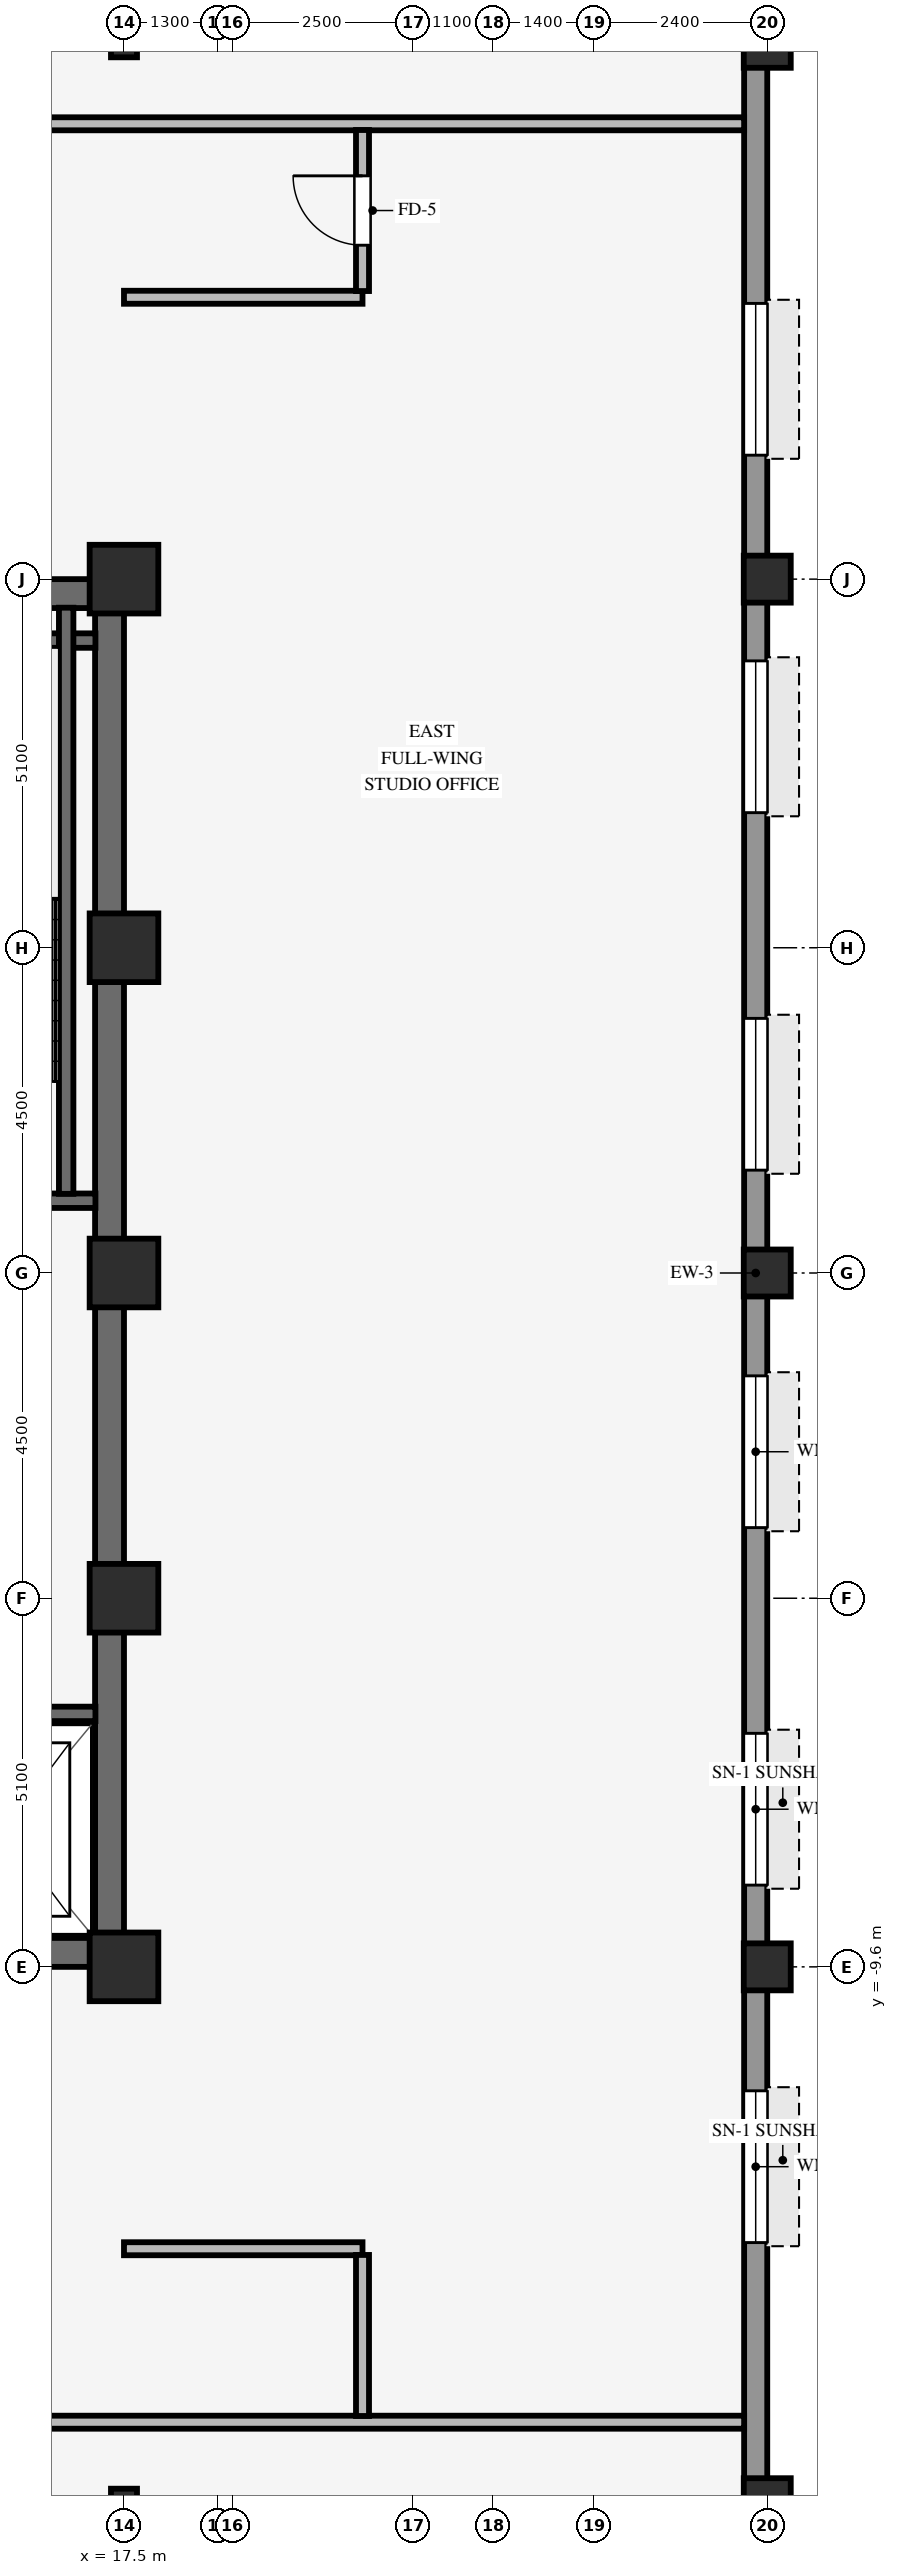
"""IFC4 building model, lengths in metres.
Left out: names, types, materials, properties, quantities, classifications, styles, units other than length and angle.
Written with IfcOpenShell. Run it as: python <this file> out.ifc"""

import sys

from ifc_helpers import new_model, si_unit, direction, frame, frame_2d, origin, origin_2d, place, context, subcontext, project, spatial, rectangle, hollow_rectangle, i_section, extrude, source, transform, mapped, element, fill, save


model = new_model("IFC4")
c1 = context("Model", 3, precision=1e-05, world=origin(), true_north=direction((0.0, 1.0)))
c2 = subcontext(c1, "Body", "Model", "MODEL_VIEW")
j1 = project(units=[si_unit("LENGTHUNIT", "METRE"), si_unit("PLANEANGLEUNIT", "RADIAN")], contexts=[c1])
p1 = place(None, origin())
s1 = spatial("IfcSite", under=j1, at=p1, CompositionType="ELEMENT")
p2 = place(p1, origin())
s2 = spatial("IfcBuilding", under=s1, at=p2, CompositionType="ELEMENT")
p3 = place(p2, frame((0.0, 0.0, 156.7)))
s3 = spatial("IfcBuildingStorey", under=s2, at=p3, CompositionType="ELEMENT", Elevation=156.7)
for number, where, z_axis, x_axis in (
    (1, (9.0, -9.4, 0.0), (0.0, 0.0, 1.0), (1.0, 0.0, 0.0)),
    (2, (9.0, 9.4, 0.0), (0.0, 0.0, 1.0), (1.0, 0.0, 0.0)),
):
    element("IfcWall", number, at=place(p3, frame(where, z_axis=z_axis, x_axis=x_axis)), inside=s3, PredefinedType="SHEAR", context=c2, shape_type="SweptSolid", body=[
        extrude(rectangle(XDim=8.5, YDim=0.4, at=frame_2d((4.25, 0.0))), origin(), (0.0, 0.0, 1.0), 3.37),
    ])
p4 = place(p3, frame((17.3, -9.205, 0.0), z_axis=(0.0, 0.0, 1.0), x_axis=(0.0, 1.0, 0.0)))
e3 = element("IfcWall", 3, at=p4, inside=s3, PredefinedType="SHEAR", context=c2, shape_type="SweptSolid", body=[
    extrude(rectangle(XDim=18.41, YDim=0.4, at=frame_2d((9.205, 0.0))), origin(), (0.0, 0.0, 1.0), 3.37),
])
for number, where, z_axis, x_axis in (
    (4, (17.5, -9.6, 0.0), (0.0, 0.0, 1.0), (1.0, 0.0, 0.0)),
    (5, (17.5, -4.5, 0.0), (0.0, 0.0, 1.0), (1.0, 0.0, 0.0)),
    (6, (17.5, 4.5, 0.0), (0.0, 0.0, 1.0), (1.0, 0.0, 0.0)),
    (7, (17.5, 9.6, 0.0), (0.0, 0.0, 1.0), (1.0, 0.0, 0.0)),
    (8, (17.5, 0.0, 0.0), (0.0, 0.0, 1.0), (1.0, 0.0, 0.0)),
):
    element("IfcColumn", number, at=place(p3, frame(where, z_axis=z_axis, x_axis=x_axis)), inside=s3, PredefinedType="COLUMN", context=c2, shape_type="SweptSolid", body=[
        extrude(rectangle(XDim=0.95, YDim=0.95, at=origin_2d()), origin(), (0.0, 0.0, 1.0), 3.37),
    ])
for number, where, z_axis, x_axis in (
    (9, (26.4, -17.0, 0.0), (0.0, 0.0, 1.0), (1.0, 0.0, 0.0)),
    (10, (26.4, -9.6, 0.0), (0.0, 0.0, 1.0), (1.0, 0.0, 0.0)),
    (11, (26.4, 0.0, 0.0), (0.0, 0.0, 1.0), (1.0, 0.0, 0.0)),
    (12, (26.4, 9.6, 0.0), (0.0, 0.0, 1.0), (1.0, 0.0, 0.0)),
    (13, (26.4, 17.0, 0.0), (0.0, 0.0, 1.0), (1.0, 0.0, 0.0)),
):
    element("IfcColumn", number, at=place(p3, frame(where, z_axis=z_axis, x_axis=x_axis)), inside=s3, PredefinedType="COLUMN", context=c2, shape_type="SweptSolid", body=[
        extrude(hollow_rectangle(XDim=0.65, YDim=0.65, WallThickness=0.04, InnerFilletRadius=0.04, OuterFilletRadius=0.08, at=origin_2d()), origin(), (0.0, 0.0, 1.0), 3.37),
    ])
for number, where, z_axis, x_axis in (
    (14, (17.5, -17.0, 0.0), (0.0, 0.0, 1.0), (1.0, 0.0, 0.0)),
    (15, (17.5, 17.0, 0.0), (0.0, 0.0, 1.0), (1.0, 0.0, 0.0)),
):
    element("IfcColumn", number, at=place(p3, frame(where, z_axis=z_axis, x_axis=x_axis)), inside=s3, PredefinedType="COLUMN", context=c2, shape_type="SweptSolid", body=[
        extrude(i_section(OverallWidth=0.36, OverallDepth=0.36, WebThickness=0.021, FlangeThickness=0.021, FilletRadius=0.018, at=origin_2d()), origin(), (0.0, 0.0, 1.0), 3.37),
    ])
p5 = place(p3, frame((26.24, -20.784, 0.0), z_axis=(0.0, 0.0, 1.0), x_axis=(0.0, 1.0, 0.0)))
e16 = element("IfcWall", 16, at=p5, inside=s3, PredefinedType="STANDARD", context=c2, shape_type="SweptSolid", body=[
    extrude(rectangle(XDim=41.568, YDim=0.32, at=frame_2d((20.784, 0.0))), origin(), (0.0, 0.0, 1.0), 2.705),
])
p6 = place(p5, frame((7.369, 0.0, 0.8)))
e17 = element("IfcOpeningElement", 17, at=p6, cuts=e16, PredefinedType="OPENING", context=c2, shape_type="SweptSolid", body=[
    extrude(rectangle(XDim=2.1, YDim=1.56, at=frame_2d((1.05, 0.78))), frame((0.0, 0.17, 0.0), z_axis=(0.0, -1.0, 0.0), x_axis=(1.0, 0.0, 0.0)), (0.0, 0.0, 1.0), 0.34),
])
p7 = place(p5, frame((12.315, 0.0, 0.8)))
e18 = element("IfcOpeningElement", 18, at=p7, cuts=e16, PredefinedType="OPENING", context=c2, shape_type="SweptSolid", body=[
    extrude(rectangle(XDim=2.1, YDim=1.56, at=frame_2d((1.05, 0.78))), frame((0.0, 0.17, 0.0), z_axis=(0.0, -1.0, 0.0), x_axis=(1.0, 0.0, 0.0)), (0.0, 0.0, 1.0), 0.34),
])
p8 = place(p5, frame((17.261, 0.0, 0.8)))
e19 = element("IfcOpeningElement", 19, at=p8, cuts=e16, PredefinedType="OPENING", context=c2, shape_type="SweptSolid", body=[
    extrude(rectangle(XDim=2.1, YDim=1.56, at=frame_2d((1.05, 0.78))), frame((0.0, 0.17, 0.0), z_axis=(0.0, -1.0, 0.0), x_axis=(1.0, 0.0, 0.0)), (0.0, 0.0, 1.0), 0.34),
])
p9 = place(p5, frame((22.207, 0.0, 0.8)))
e20 = element("IfcOpeningElement", 20, at=p9, cuts=e16, PredefinedType="OPENING", context=c2, shape_type="SweptSolid", body=[
    extrude(rectangle(XDim=2.1, YDim=1.56, at=frame_2d((1.05, 0.78))), frame((0.0, 0.17, 0.0), z_axis=(0.0, -1.0, 0.0), x_axis=(1.0, 0.0, 0.0)), (0.0, 0.0, 1.0), 0.34),
])
p10 = place(p5, frame((27.153, 0.0, 0.8)))
e21 = element("IfcOpeningElement", 21, at=p10, cuts=e16, PredefinedType="OPENING", context=c2, shape_type="SweptSolid", body=[
    extrude(rectangle(XDim=2.1, YDim=1.56, at=frame_2d((1.05, 0.78))), frame((0.0, 0.17, 0.0), z_axis=(0.0, -1.0, 0.0), x_axis=(1.0, 0.0, 0.0)), (0.0, 0.0, 1.0), 0.34),
])
p11 = place(p5, frame((32.099, 0.0, 0.8)))
e22 = element("IfcOpeningElement", 22, at=p11, cuts=e16, PredefinedType="OPENING", context=c2, shape_type="SweptSolid", body=[
    extrude(rectangle(XDim=2.1, YDim=1.56, at=frame_2d((1.05, 0.78))), frame((0.0, 0.17, 0.0), z_axis=(0.0, -1.0, 0.0), x_axis=(1.0, 0.0, 0.0)), (0.0, 0.0, 1.0), 0.34),
])
for number, where, z_axis, x_axis in (
    (23, (13.535, 1.0, 0.0), (0.0, 0.0, 1.0), (1.0, 0.0, 0.0)),
    (24, (13.535, 8.75, 0.0), (0.0, 0.0, 1.0), (1.0, 0.0, 0.0)),
):
    element("IfcWall", number, at=place(p3, frame(where, z_axis=z_axis, x_axis=x_axis)), inside=s3, PredefinedType="SHEAR", context=c2, shape_type="SweptSolid", body=[
        extrude(rectangle(XDim=3.57, YDim=0.2, at=frame_2d((1.785, 0.0))), origin(), (0.0, 0.0, 1.0), 3.37),
    ])
p12 = place(p3, frame((16.7, 1.095, 0.0), z_axis=(0.0, 0.0, 1.0), x_axis=(0.0, 1.0, 0.0)))
e25 = element("IfcWall", 25, at=p12, inside=s3, PredefinedType="SHEAR", context=c2, shape_type="SweptSolid", body=[
    extrude(rectangle(XDim=8.11, YDim=0.2, at=frame_2d((4.055, 0.0))), origin(), (0.0, 0.0, 1.0), 3.37),
])
p13 = place(p3, frame((14.645, -6.1, 0.0), z_axis=(0.0, 0.0, 1.0), x_axis=(1.0, 0.0, 0.0)))
e26 = element("IfcWall", 26, at=p13, inside=s3, PredefinedType="SHEAR", context=c2, shape_type="SweptSolid", body=[
    extrude(rectangle(XDim=2.46, YDim=0.2, at=frame_2d((1.23, 0.0))), origin(), (0.0, 0.0, 1.0), 3.37),
])
p14 = place(p3, frame((-26.08, -15.9, 0.0), z_axis=(0.0, 0.0, 1.0), x_axis=(1.0, 0.0, 0.0)))
e27 = element("IfcWall", 27, at=p14, inside=s3, PredefinedType="PARTITIONING", context=c2, shape_type="SweptSolid", body=[
    extrude(rectangle(XDim=52.16, YDim=0.18, at=frame_2d((26.08, 0.0))), origin(), (0.0, 0.0, 1.0), 3.36),
])
p15 = place(p14, frame((24.5, 0.0, 0.0)))
e28 = element("IfcOpeningElement", 28, at=p15, cuts=e27, PredefinedType="OPENING", context=c2, shape_type="SweptSolid", body=[
    extrude(rectangle(XDim=0.96, YDim=2.1, at=frame_2d((0.48, 1.05))), frame((0.0, 0.1, 0.0), z_axis=(0.0, -1.0, 0.0), x_axis=(1.0, 0.0, 0.0)), (0.0, 0.0, 1.0), 0.2),
])
p16 = place(p14, frame((40.5, 0.0, 0.0)))
e29 = element("IfcOpeningElement", 29, at=p16, cuts=e27, PredefinedType="OPENING", context=c2, shape_type="SweptSolid", body=[
    extrude(rectangle(XDim=0.96, YDim=2.1, at=frame_2d((0.48, 1.05))), frame((0.0, 0.1, 0.0), z_axis=(0.0, -1.0, 0.0), x_axis=(1.0, 0.0, 0.0)), (0.0, 0.0, 1.0), 0.2),
])
p17 = place(p14, frame((13.16, 0.0, 0.0)))
e30 = element("IfcOpeningElement", 30, at=p17, cuts=e27, PredefinedType="OPENING", context=c2, shape_type="SweptSolid", body=[
    extrude(rectangle(XDim=0.96, YDim=2.1, at=frame_2d((0.48, 1.05))), frame((0.0, 0.1, 0.0), z_axis=(0.0, -1.0, 0.0), x_axis=(1.0, 0.0, 0.0)), (0.0, 0.0, 1.0), 0.2),
])
p18 = place(p14, frame((6.425, 0.0, 0.0)))
e31 = element("IfcOpeningElement", 31, at=p18, cuts=e27, PredefinedType="OPENING", context=c2, shape_type="SweptSolid", body=[
    extrude(rectangle(XDim=0.96, YDim=2.1, at=frame_2d((0.48, 1.05))), frame((0.0, 0.1, 0.0), z_axis=(0.0, -1.0, 0.0), x_axis=(1.0, 0.0, 0.0)), (0.0, 0.0, 1.0), 0.2),
])
for number, where, z_axis, x_axis in (
    (32, (17.5, -13.5, 0.0), (0.0, 0.0, 1.0), (1.0, 0.0, 0.0)),
    (33, (17.5, 13.5, 0.0), (0.0, 0.0, 1.0), (1.0, 0.0, 0.0)),
):
    element("IfcWall", number, at=place(p3, frame(where, z_axis=z_axis, x_axis=x_axis)), inside=s3, PredefinedType="PARTITIONING", context=c2, shape_type="SweptSolid", body=[
        extrude(rectangle(XDim=3.3, YDim=0.18, at=frame_2d((1.65, 0.0))), origin(), (0.0, 0.0, 1.0), 2.998),
    ])
p19 = place(p3, frame((-26.08, 15.9, 0.0), z_axis=(0.0, 0.0, 1.0), x_axis=(1.0, 0.0, 0.0)))
e34 = element("IfcWall", 34, at=p19, inside=s3, PredefinedType="PARTITIONING", context=c2, shape_type="SweptSolid", body=[
    extrude(rectangle(XDim=52.16, YDim=0.18, at=frame_2d((26.08, 0.0))), origin(), (0.0, 0.0, 1.0), 3.36),
])
p20 = place(p19, frame((26.72, 0.0, 0.0)))
e35 = element("IfcOpeningElement", 35, at=p20, cuts=e34, PredefinedType="OPENING", context=c2, shape_type="SweptSolid", body=[
    extrude(rectangle(XDim=0.96, YDim=2.1, at=frame_2d((0.48, 1.05))), frame((0.0, 0.1, 0.0), z_axis=(0.0, -1.0, 0.0), x_axis=(1.0, 0.0, 0.0)), (0.0, 0.0, 1.0), 0.2),
])
p21 = place(p19, frame((40.5, 0.0, 0.0)))
e36 = element("IfcOpeningElement", 36, at=p21, cuts=e34, PredefinedType="OPENING", context=c2, shape_type="SweptSolid", body=[
    extrude(rectangle(XDim=0.96, YDim=2.1, at=frame_2d((0.48, 1.05))), frame((0.0, 0.1, 0.0), z_axis=(0.0, -1.0, 0.0), x_axis=(1.0, 0.0, 0.0)), (0.0, 0.0, 1.0), 0.2),
])
p22 = place(p19, frame((13.61, 0.0, 0.0)))
e37 = element("IfcOpeningElement", 37, at=p22, cuts=e34, PredefinedType="OPENING", context=c2, shape_type="SweptSolid", body=[
    extrude(rectangle(XDim=0.96, YDim=2.1, at=frame_2d((0.48, 1.05))), frame((0.0, 0.1, 0.0), z_axis=(0.0, -1.0, 0.0), x_axis=(1.0, 0.0, 0.0)), (0.0, 0.0, 1.0), 0.2),
])
p23 = place(p3, frame((20.8, -15.814, 0.0), z_axis=(0.0, 0.0, 1.0), x_axis=(0.0, 1.0, 0.0)))
e38 = element("IfcWall", 38, at=p23, inside=s3, PredefinedType="PARTITIONING", context=c2, shape_type="SweptSolid", body=[
    extrude(rectangle(XDim=2.228, YDim=0.18, at=frame_2d((1.114, 0.0))), origin(), (0.0, 0.0, 1.0), 3.36),
])
p24 = place(p3, frame((20.8, 13.586, 0.0), z_axis=(0.0, 0.0, 1.0), x_axis=(0.0, 1.0, 0.0)))
e39 = element("IfcWall", 39, at=p24, inside=s3, PredefinedType="PARTITIONING", context=c2, shape_type="SweptSolid", body=[
    extrude(rectangle(XDim=2.228, YDim=0.18, at=frame_2d((1.114, 0.0))), origin(), (0.0, 0.0, 1.0), 3.36),
])
p25 = place(p24, frame((0.634, 0.0, 0.0)))
e40 = element("IfcOpeningElement", 40, at=p25, cuts=e39, PredefinedType="OPENING", context=c2, shape_type="SweptSolid", body=[
    extrude(rectangle(XDim=0.96, YDim=2.1, at=frame_2d((0.48, 1.05))), frame((0.0, 0.1, 0.0), z_axis=(0.0, -1.0, 0.0), x_axis=(1.0, 0.0, 0.0)), (0.0, 0.0, 1.0), 0.2),
])
m1 = source(origin(), c2, "Body", "SweptSolid", [
    extrude(rectangle(XDim=2.1, YDim=1.56, at=frame_2d((1.05, 0.78))), frame((0.0, 0.03, 0.0), z_axis=(0.0, -1.0, 0.0), x_axis=(1.0, 0.0, 0.0)), (0.0, 0.0, 1.0), 0.06),
])
p26 = place(p6, origin())
e41 = element("IfcWindow", 41, at=p26, inside=s3, PartitioningType="SINGLE_PANEL", PredefinedType="WINDOW", context=c2, shape_type="MappedRepresentation", body=[
    mapped(m1, transform((0.0, 0.0, 0.0), scale=1.0)),
])
fill(e17, e41)
p27 = place(p7, origin())
e42 = element("IfcWindow", 42, at=p27, inside=s3, PartitioningType="SINGLE_PANEL", PredefinedType="WINDOW", context=c2, shape_type="MappedRepresentation", body=[
    mapped(m1, transform((0.0, 0.0, 0.0), scale=1.0)),
])
fill(e18, e42)
p28 = place(p8, origin())
e43 = element("IfcWindow", 43, at=p28, inside=s3, PartitioningType="SINGLE_PANEL", PredefinedType="WINDOW", context=c2, shape_type="MappedRepresentation", body=[
    mapped(m1, transform((0.0, 0.0, 0.0), scale=1.0)),
])
fill(e19, e43)
p29 = place(p9, origin())
e44 = element("IfcWindow", 44, at=p29, inside=s3, PartitioningType="SINGLE_PANEL", PredefinedType="WINDOW", context=c2, shape_type="MappedRepresentation", body=[
    mapped(m1, transform((0.0, 0.0, 0.0), scale=1.0)),
])
fill(e20, e44)
p30 = place(p10, origin())
e45 = element("IfcWindow", 45, at=p30, inside=s3, PartitioningType="SINGLE_PANEL", PredefinedType="WINDOW", context=c2, shape_type="MappedRepresentation", body=[
    mapped(m1, transform((0.0, 0.0, 0.0), scale=1.0)),
])
fill(e21, e45)
p31 = place(p11, origin())
e46 = element("IfcWindow", 46, at=p31, inside=s3, PartitioningType="SINGLE_PANEL", PredefinedType="WINDOW", context=c2, shape_type="MappedRepresentation", body=[
    mapped(m1, transform((0.0, 0.0, 0.0), scale=1.0)),
])
fill(e22, e46)
m2 = source(origin(), c2, "Body", "SweptSolid", [
    extrude(rectangle(XDim=0.96, YDim=2.1, at=frame_2d((0.48, 1.05))), frame((0.0, 0.025, 0.0), z_axis=(0.0, -1.0, 0.0), x_axis=(1.0, 0.0, 0.0)), (0.0, 0.0, 1.0), 0.05),
])
p32 = place(p25, origin())
e47 = element("IfcDoor", 47, at=p32, inside=s3, OperationType="SINGLE_SWING_RIGHT", PredefinedType="DOOR", context=c2, shape_type="MappedRepresentation", body=[
    mapped(m2, transform((0.0, 0.0, 0.0), scale=1.0)),
])
fill(e40, e47)
save(model, sys.argv[1])
